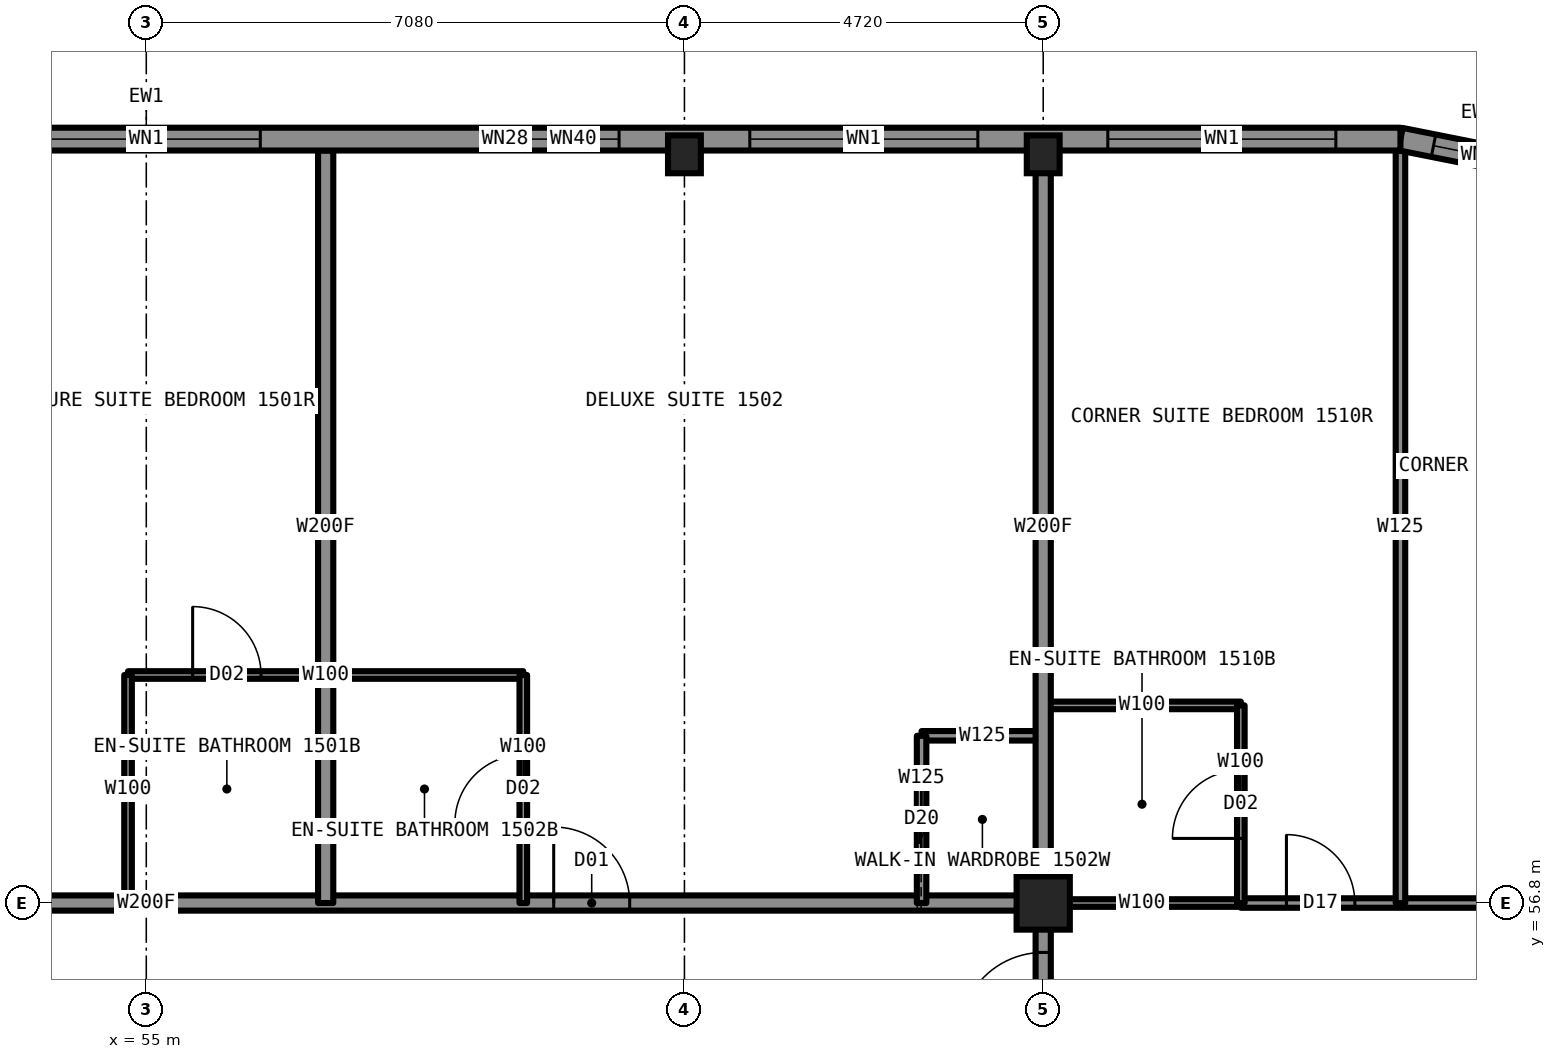
"""IFC4 building model, lengths in metres.
Left out: names, types, materials, properties, quantities, classifications, styles, units other than length and angle.
Written with IfcOpenShell. Run it as: python <this file> out.ifc"""

import sys

from ifc_helpers import new_model, si_unit, direction, frame, frame_2d, origin, origin_2d, place, context, subcontext, project, spatial, rectangle, hollow_rectangle, i_section, extrude, element, fill, save


model = new_model("IFC4")
c1 = context("Model", 3, precision=1e-05, world=origin(), true_north=direction((0.0, 1.0)))
c2 = subcontext(c1, "Body", "Model", "MODEL_VIEW")
j1 = project(units=[si_unit("LENGTHUNIT", "METRE"), si_unit("PLANEANGLEUNIT", "RADIAN")], contexts=[c1])
p1 = place(None, origin())
s1 = spatial("IfcSite", under=j1, at=p1, CompositionType="ELEMENT")
p2 = place(p1, origin())
s2 = spatial("IfcBuilding", under=s1, at=p2, CompositionType="ELEMENT")
p3 = place(p2, frame((0.0, 0.0, 60.0)))
s3 = spatial("IfcBuildingStorey", under=s2, at=p3, CompositionType="ELEMENT", Elevation=60.0)
for number, where, z_axis, x_axis in (
    (1, (62.08, 66.65, 0.0), (0.0, 0.0, 1.0), (1.0, 0.0, 0.0)),
    (2, (66.8, 66.65, 0.0), (0.0, 0.0, 1.0), (1.0, 0.0, 0.0)),
):
    element("IfcColumn", number, at=place(p3, frame(where, z_axis=z_axis, x_axis=x_axis)), inside=s3, PredefinedType="COLUMN", context=c2, shape_type="SweptSolid", body=[
        extrude(i_section(OverallWidth=0.432, OverallDepth=0.498, WebThickness=0.056, FlangeThickness=0.089, at=origin_2d()), origin(), (0.0, 0.0, 1.0), 3.5),
    ])
p4 = place(p3, frame((66.8, 56.8, 0.0), z_axis=(0.0, 0.0, 1.0), x_axis=(1.0, 0.0, 0.0)))
e3 = element("IfcColumn", 3, at=p4, inside=s3, PredefinedType="COLUMN", context=c2, shape_type="SweptSolid", body=[
    extrude(hollow_rectangle(XDim=0.7, YDim=0.7, WallThickness=0.06, at=origin_2d()), origin(), (0.0, 0.0, 1.0), 3.5),
])
p5 = place(p3, frame((66.8, 56.8, 0.0), z_axis=(0.0, 0.0, 1.0), x_axis=(1.0, 0.0, 0.0)))
e4 = element("IfcWall", 4, at=p5, inside=s3, PredefinedType="PARTITIONING", context=c2, shape_type="SweptSolid", body=[
    extrude(rectangle(XDim=2.6, YDim=0.1, at=frame_2d((1.3, 0.0))), origin(), (0.0, 0.0, 1.0), 2.573),
])
p6 = place(p3, frame((43.2, 56.8, 0.0), z_axis=(0.0, 0.0, 1.0), x_axis=(1.0, 0.0, 0.0)))
e5 = element("IfcWall", 5, at=p6, inside=s3, PredefinedType="PARTITIONING", context=c2, shape_type="SweptSolid", body=[
    extrude(rectangle(XDim=23.6, YDim=0.2, at=frame_2d((11.8, 0.0))), origin(), (0.0, 0.0, 1.0), 3.33),
])
p7 = place(p6, frame((1.85, 0.0, 0.0)))
e6 = element("IfcOpeningElement", 6, at=p7, cuts=e5, PredefinedType="OPENING", context=c2, shape_type="SweptSolid", body=[
    extrude(rectangle(XDim=1.1, YDim=2.2, at=frame_2d((0.55, 1.1))), frame((0.0, 0.11, 0.0), z_axis=(0.0, -1.0, 0.0), x_axis=(1.0, 0.0, 0.0)), (0.0, 0.0, 1.0), 0.22),
])
p8 = place(p6, frame((17.16, 0.0, 0.0)))
e7 = element("IfcOpeningElement", 7, at=p8, cuts=e5, PredefinedType="OPENING", context=c2, shape_type="SweptSolid", body=[
    extrude(rectangle(XDim=1.0, YDim=2.2, at=frame_2d((0.5, 1.1))), frame((0.0, 0.11, 0.0), z_axis=(0.0, -1.0, 0.0), x_axis=(1.0, 0.0, 0.0)), (0.0, 0.0, 1.0), 0.22),
])
p9 = place(p3, frame((69.4, 56.8, 0.0), z_axis=(0.0, 0.0, 1.0), x_axis=(1.0, 0.0, 0.0)))
e8 = element("IfcWall", 8, at=p9, inside=s3, PredefinedType="PARTITIONING", context=c2, shape_type="SweptSolid", body=[
    extrude(rectangle(XDim=7.3, YDim=0.125, at=frame_2d((3.65, 0.0))), origin(), (0.0, 0.0, 1.0), 2.573),
])
p10 = place(p9, frame((0.6, 0.0, 0.0)))
e9 = element("IfcOpeningElement", 9, at=p10, cuts=e8, PredefinedType="OPENING", context=c2, shape_type="SweptSolid", body=[
    extrude(rectangle(XDim=0.9, YDim=2.2, at=frame_2d((0.45, 1.1))), frame((0.0, 0.073, 0.0), z_axis=(0.0, -1.0, 0.0), x_axis=(1.0, 0.0, 0.0)), (0.0, 0.0, 1.0), 0.145),
])
p11 = place(p9, frame((4.4, 0.0, 0.0)))
e10 = element("IfcOpeningElement", 10, at=p11, cuts=e8, PredefinedType="OPENING", context=c2, shape_type="SweptSolid", body=[
    extrude(rectangle(XDim=0.9, YDim=2.2, at=frame_2d((0.45, 1.1))), frame((0.0, 0.073, 0.0), z_axis=(0.0, -1.0, 0.0), x_axis=(1.0, 0.0, 0.0)), (0.0, 0.0, 1.0), 0.145),
])
p12 = place(p3, frame((65.2, 59.0, 0.0), z_axis=(0.0, 0.0, 1.0), x_axis=(1.0, 0.0, 0.0)))
e11 = element("IfcWall", 11, at=p12, inside=s3, PredefinedType="PARTITIONING", context=c2, shape_type="SweptSolid", body=[
    extrude(rectangle(XDim=1.6, YDim=0.125, at=frame_2d((0.8, 0.0))), origin(), (0.0, 0.0, 1.0), 3.33),
])
p13 = place(p3, frame((66.8, 59.4, 0.0), z_axis=(0.0, 0.0, 1.0), x_axis=(1.0, 0.0, 0.0)))
e12 = element("IfcWall", 12, at=p13, inside=s3, PredefinedType="PARTITIONING", context=c2, shape_type="SweptSolid", body=[
    extrude(rectangle(XDim=2.6, YDim=0.1, at=frame_2d((1.3, 0.0))), origin(), (0.0, 0.0, 1.0), 3.33),
])
p14 = place(p3, frame((54.76, 59.8, 0.0), z_axis=(0.0, 0.0, 1.0), x_axis=(1.0, 0.0, 0.0)))
e13 = element("IfcWall", 13, at=p14, inside=s3, PredefinedType="PARTITIONING", context=c2, shape_type="SweptSolid", body=[
    extrude(rectangle(XDim=5.2, YDim=0.1, at=frame_2d((2.6, 0.0))), origin(), (0.0, 0.0, 1.0), 3.33),
])
p15 = place(p14, frame((0.85, 0.0, 0.0)))
e14 = element("IfcOpeningElement", 14, at=p15, cuts=e13, PredefinedType="OPENING", context=c2, shape_type="SweptSolid", body=[
    extrude(rectangle(XDim=0.9, YDim=2.1, at=frame_2d((0.45, 1.05))), frame((0.0, 0.06, 0.0), z_axis=(0.0, -1.0, 0.0), x_axis=(1.0, 0.0, 0.0)), (0.0, 0.0, 1.0), 0.12),
])
p16 = place(p3, frame((54.76, 56.8, 0.0), z_axis=(0.0, 0.0, 1.0), x_axis=(0.0, 1.0, 0.0)))
e15 = element("IfcWall", 15, at=p16, inside=s3, PredefinedType="PARTITIONING", context=c2, shape_type="SweptSolid", body=[
    extrude(rectangle(XDim=3.0, YDim=0.1, at=frame_2d((1.5, 0.0))), origin(), (0.0, 0.0, 1.0), 3.33),
])
p17 = place(p3, frame((65.2, 56.8, 0.0), z_axis=(0.0, 0.0, 1.0), x_axis=(0.0, 1.0, 0.0)))
e16 = element("IfcWall", 16, at=p17, inside=s3, PredefinedType="PARTITIONING", context=c2, shape_type="SweptSolid", body=[
    extrude(rectangle(XDim=2.2, YDim=0.125, at=frame_2d((1.1, 0.0))), origin(), (0.0, 0.0, 1.0), 3.33),
])
p18 = place(p17, frame((0.7, 0.0, 0.0)))
e17 = element("IfcOpeningElement", 17, at=p18, cuts=e16, PredefinedType="OPENING", context=c2, shape_type="SweptSolid", body=[
    extrude(rectangle(XDim=0.8, YDim=2.1, at=frame_2d((0.4, 1.05))), frame((0.0, 0.073, 0.0), z_axis=(0.0, -1.0, 0.0), x_axis=(1.0, 0.0, 0.0)), (0.0, 0.0, 1.0), 0.145),
])
p19 = place(p3, frame((66.8, 33.22, 0.0), z_axis=(0.0, 0.0, 1.0), x_axis=(0.0, 1.0, 0.0)))
e18 = element("IfcWall", 18, at=p19, inside=s3, PredefinedType="PARTITIONING", context=c2, shape_type="SweptSolid", body=[
    extrude(rectangle(XDim=23.58, YDim=0.2, at=frame_2d((11.79, 0.0))), origin(), (0.0, 0.0, 1.0), 3.33),
])
p20 = place(p19, frame((7.7, 0.0, 0.0)))
e19 = element("IfcOpeningElement", 19, at=p20, cuts=e18, PredefinedType="OPENING", context=c2, shape_type="SweptSolid", body=[
    extrude(rectangle(XDim=1.0, YDim=2.2, at=frame_2d((0.5, 1.1))), frame((0.0, 0.11, 0.0), z_axis=(0.0, -1.0, 0.0), x_axis=(1.0, 0.0, 0.0)), (0.0, 0.0, 1.0), 0.22),
])
p21 = place(p19, frame((17.29, 0.0, 0.0)))
e20 = element("IfcOpeningElement", 20, at=p21, cuts=e18, PredefinedType="OPENING", context=c2, shape_type="SweptSolid", body=[
    extrude(rectangle(XDim=1.0, YDim=2.2, at=frame_2d((0.5, 1.1))), frame((0.0, 0.11, 0.0), z_axis=(0.0, -1.0, 0.0), x_axis=(1.0, 0.0, 0.0)), (0.0, 0.0, 1.0), 0.22),
])
p22 = place(p19, frame((21.83, 0.0, 0.0)))
e21 = element("IfcOpeningElement", 21, at=p22, cuts=e18, PredefinedType="OPENING", context=c2, shape_type="SweptSolid", body=[
    extrude(rectangle(XDim=1.1, YDim=2.2, at=frame_2d((0.55, 1.1))), frame((0.0, 0.11, 0.0), z_axis=(0.0, -1.0, 0.0), x_axis=(1.0, 0.0, 0.0)), (0.0, 0.0, 1.0), 0.22),
])
p23 = place(p19, frame((0.63, 0.0, 0.0)))
e22 = element("IfcOpeningElement", 22, at=p23, cuts=e18, PredefinedType="OPENING", context=c2, shape_type="SweptSolid", body=[
    extrude(rectangle(XDim=1.1, YDim=2.2, at=frame_2d((0.55, 1.1))), frame((0.0, 0.11, 0.0), z_axis=(0.0, -1.0, 0.0), x_axis=(1.0, 0.0, 0.0)), (0.0, 0.0, 1.0), 0.22),
])
p24 = place(p3, frame((66.8, 56.8, 0.0), z_axis=(0.0, 0.0, 1.0), x_axis=(0.0, 1.0, 0.0)))
e23 = element("IfcWall", 23, at=p24, inside=s3, PredefinedType="PARTITIONING", context=c2, shape_type="SweptSolid", body=[
    extrude(rectangle(XDim=9.9, YDim=0.2, at=frame_2d((4.95, 0.0))), origin(), (0.0, 0.0, 1.0), 2.573),
])
p25 = place(p3, frame((69.4, 56.8, 0.0), z_axis=(0.0, 0.0, 1.0), x_axis=(0.0, 1.0, 0.0)))
e24 = element("IfcWall", 24, at=p25, inside=s3, PredefinedType="PARTITIONING", context=c2, shape_type="SweptSolid", body=[
    extrude(rectangle(XDim=2.6, YDim=0.1, at=frame_2d((1.3, 0.0))), origin(), (0.0, 0.0, 1.0), 3.33),
])
p26 = place(p25, frame((0.85, 0.0, 0.0)))
e25 = element("IfcOpeningElement", 25, at=p26, cuts=e24, PredefinedType="OPENING", context=c2, shape_type="SweptSolid", body=[
    extrude(rectangle(XDim=0.9, YDim=2.1, at=frame_2d((0.45, 1.05))), frame((0.0, 0.06, 0.0), z_axis=(0.0, -1.0, 0.0), x_axis=(1.0, 0.0, 0.0)), (0.0, 0.0, 1.0), 0.12),
])
p27 = place(p3, frame((71.5, 56.8, 0.0), z_axis=(0.0, 0.0, 1.0), x_axis=(0.0, 1.0, 0.0)))
e26 = element("IfcWall", 26, at=p27, inside=s3, PredefinedType="PARTITIONING", context=c2, shape_type="SweptSolid", body=[
    extrude(rectangle(XDim=9.894, YDim=0.125, at=frame_2d((4.947, 0.0))), origin(), (0.0, 0.0, 1.0), 3.33),
])
p28 = place(p3, frame((57.36, 56.8, 0.0), z_axis=(0.0, 0.0, 1.0), x_axis=(0.0, 1.0, 0.0)))
e27 = element("IfcWall", 27, at=p28, inside=s3, PredefinedType="PARTITIONING", context=c2, shape_type="SweptSolid", body=[
    extrude(rectangle(XDim=9.9, YDim=0.2, at=frame_2d((4.95, 0.0))), origin(), (0.0, 0.0, 1.0), 3.33),
])
p29 = place(p3, frame((59.96, 56.8, 0.0), z_axis=(0.0, 0.0, 1.0), x_axis=(0.0, 1.0, 0.0)))
e28 = element("IfcWall", 28, at=p29, inside=s3, PredefinedType="PARTITIONING", context=c2, shape_type="SweptSolid", body=[
    extrude(rectangle(XDim=3.0, YDim=0.1, at=frame_2d((1.5, 0.0))), origin(), (0.0, 0.0, 1.0), 3.33),
])
p30 = place(p29, frame((1.05, 0.0, 0.0)))
e29 = element("IfcOpeningElement", 29, at=p30, cuts=e28, PredefinedType="OPENING", context=c2, shape_type="SweptSolid", body=[
    extrude(rectangle(XDim=0.9, YDim=2.1, at=frame_2d((0.45, 1.05))), frame((0.0, 0.06, 0.0), z_axis=(0.0, -1.0, 0.0), x_axis=(1.0, 0.0, 0.0)), (0.0, 0.0, 1.0), 0.12),
])
p31 = place(p3, frame((73.547, 66.443, 0.0), z_axis=(0.0, 0.0, 1.0), x_axis=(-0.980787050784, 0.195081421501, 0.0)))
e30 = element("IfcWall", 30, at=p31, inside=s3, PredefinedType="SOLIDWALL", context=c2, shape_type="SweptSolid", body=[
    extrude(rectangle(XDim=2.087, YDim=0.3, at=frame_2d((1.044, 0.0))), origin(), (0.0, 0.0, 1.0), 3.33),
])
p32 = place(p31, frame((0.444, 0.0, 0.5)))
e31 = element("IfcOpeningElement", 31, at=p32, cuts=e30, PredefinedType="OPENING", context=c2, shape_type="SweptSolid", body=[
    extrude(rectangle(XDim=1.2, YDim=2.0, at=frame_2d((0.6, 1.0))), frame((0.0, 0.16, 0.0), z_axis=(0.0, -1.0, 0.0), x_axis=(1.0, 0.0, 0.0)), (0.0, 0.0, 1.0), 0.32),
])
p33 = place(p3, frame((71.5, 66.85, 0.0), z_axis=(0.0, 0.0, 1.0), x_axis=(-1.0, 0.0, 0.0)))
e32 = element("IfcWall", 32, at=p33, inside=s3, PredefinedType="SOLIDWALL", context=c2, shape_type="SweptSolid", body=[
    extrude(rectangle(XDim=33.0, YDim=0.3, at=frame_2d((16.5, 0.0))), origin(), (0.0, 0.0, 1.0), 2.83),
])
p34 = place(p33, frame((0.85, 0.0, 0.5)))
e33 = element("IfcOpeningElement", 33, at=p34, cuts=e32, PredefinedType="OPENING", context=c2, shape_type="SweptSolid", body=[
    extrude(rectangle(XDim=3.0, YDim=2.0, at=frame_2d((1.5, 1.0))), frame((0.0, 0.16, 0.0), z_axis=(0.0, -1.0, 0.0), x_axis=(1.0, 0.0, 0.0)), (0.0, 0.0, 1.0), 0.32),
])
p35 = place(p33, frame((5.56, 0.0, 0.5)))
e34 = element("IfcOpeningElement", 34, at=p35, cuts=e32, PredefinedType="OPENING", context=c2, shape_type="SweptSolid", body=[
    extrude(rectangle(XDim=3.0, YDim=2.0, at=frame_2d((1.5, 1.0))), frame((0.0, 0.16, 0.0), z_axis=(0.0, -1.0, 0.0), x_axis=(1.0, 0.0, 0.0)), (0.0, 0.0, 1.0), 0.32),
])
p36 = place(p33, frame((10.28, 0.0, 0.5)))
e35 = element("IfcOpeningElement", 35, at=p36, cuts=e32, PredefinedType="OPENING", context=c2, shape_type="SweptSolid", body=[
    extrude(rectangle(XDim=1.2, YDim=1.7, at=frame_2d((0.6, 0.85))), frame((0.0, 0.16, 0.0), z_axis=(0.0, -1.0, 0.0), x_axis=(1.0, 0.0, 0.0)), (0.0, 0.0, 1.0), 0.32),
])
p37 = place(p33, frame((15.0, 0.0, 0.5)))
e36 = element("IfcOpeningElement", 36, at=p37, cuts=e32, PredefinedType="OPENING", context=c2, shape_type="SweptSolid", body=[
    extrude(rectangle(XDim=3.0, YDim=2.0, at=frame_2d((1.5, 1.0))), frame((0.0, 0.16, 0.0), z_axis=(0.0, -1.0, 0.0), x_axis=(1.0, 0.0, 0.0)), (0.0, 0.0, 1.0), 0.32),
])
p38 = place(p33, frame((21.52, 0.0, 0.5)))
e37 = element("IfcOpeningElement", 37, at=p38, cuts=e32, PredefinedType="OPENING", context=c2, shape_type="SweptSolid", body=[
    extrude(rectangle(XDim=1.2, YDim=1.7, at=frame_2d((0.6, 0.85))), frame((0.0, 0.16, 0.0), z_axis=(0.0, -1.0, 0.0), x_axis=(1.0, 0.0, 0.0)), (0.0, 0.0, 1.0), 0.32),
])
p39 = place(p33, frame((24.44, 0.0, 0.5)))
e38 = element("IfcOpeningElement", 38, at=p39, cuts=e32, PredefinedType="OPENING", context=c2, shape_type="SweptSolid", body=[
    extrude(rectangle(XDim=3.0, YDim=2.0, at=frame_2d((1.5, 1.0))), frame((0.0, 0.16, 0.0), z_axis=(0.0, -1.0, 0.0), x_axis=(1.0, 0.0, 0.0)), (0.0, 0.0, 1.0), 0.32),
])
p40 = place(p33, frame((29.15, 0.0, 0.5)))
e39 = element("IfcOpeningElement", 39, at=p40, cuts=e32, PredefinedType="OPENING", context=c2, shape_type="SweptSolid", body=[
    extrude(rectangle(XDim=3.0, YDim=2.0, at=frame_2d((1.5, 1.0))), frame((0.0, 0.16, 0.0), z_axis=(0.0, -1.0, 0.0), x_axis=(1.0, 0.0, 0.0)), (0.0, 0.0, 1.0), 0.32),
])
p41 = place(p33, frame((11.48, 0.0, 0.5)))
e40 = element("IfcOpeningElement", 40, at=p41, cuts=e32, PredefinedType="OPENING", context=c2, shape_type="SweptSolid", body=[
    extrude(rectangle(XDim=0.6, YDim=0.8, at=frame_2d((0.3, 0.4))), frame((0.0, 0.16, 0.0), z_axis=(0.0, -1.0, 0.0), x_axis=(1.0, 0.0, 0.0)), (0.0, 0.0, 1.0), 0.32),
])
p42 = place(p33, frame((20.87, 0.0, 0.5)))
e41 = element("IfcOpeningElement", 41, at=p42, cuts=e32, PredefinedType="OPENING", context=c2, shape_type="SweptSolid", body=[
    extrude(rectangle(XDim=0.6, YDim=0.8, at=frame_2d((0.3, 0.4))), frame((0.0, 0.16, 0.0), z_axis=(0.0, -1.0, 0.0), x_axis=(1.0, 0.0, 0.0)), (0.0, 0.0, 1.0), 0.32),
])
p43 = place(p15, origin())
e42 = element("IfcDoor", 42, at=p43, inside=s3, OperationType="SINGLE_SWING_RIGHT", PredefinedType="DOOR", context=c2, shape_type="SweptSolid", body=[
    extrude(rectangle(XDim=0.9, YDim=2.1, at=frame_2d((0.45, 1.05))), frame((0.0, 0.025, 0.0), z_axis=(0.0, -1.0, 0.0), x_axis=(1.0, 0.0, 0.0)), (0.0, 0.0, 1.0), 0.05),
])
fill(e14, e42)
p44 = place(p8, origin())
e43 = element("IfcDoor", 43, at=p44, inside=s3, OperationType="SINGLE_SWING_LEFT", PredefinedType="DOOR", context=c2, shape_type="SweptSolid", body=[
    extrude(rectangle(XDim=1.0, YDim=2.2, at=frame_2d((0.5, 1.1))), frame((0.0, 0.025, 0.0), z_axis=(0.0, -1.0, 0.0), x_axis=(1.0, 0.0, 0.0)), (0.0, 0.0, 1.0), 0.05),
])
fill(e7, e43)
p45 = place(p30, origin())
e44 = element("IfcDoor", 44, at=p45, inside=s3, OperationType="SINGLE_SWING_RIGHT", PredefinedType="DOOR", context=c2, shape_type="SweptSolid", body=[
    extrude(rectangle(XDim=0.9, YDim=2.1, at=frame_2d((0.45, 1.05))), frame((0.0, 0.025, 0.0), z_axis=(0.0, -1.0, 0.0), x_axis=(1.0, 0.0, 0.0)), (0.0, 0.0, 1.0), 0.05),
])
fill(e29, e44)
p46 = place(p18, origin())
e45 = element("IfcDoor", 45, at=p46, inside=s3, OperationType="SLIDING_TO_LEFT", PredefinedType="DOOR", context=c2, shape_type="SweptSolid", body=[
    extrude(rectangle(XDim=0.8, YDim=2.1, at=frame_2d((0.4, 1.05))), frame((0.0, 0.025, 0.0), z_axis=(0.0, -1.0, 0.0), x_axis=(1.0, 0.0, 0.0)), (0.0, 0.0, 1.0), 0.05),
])
fill(e17, e45)
p47 = place(p22, origin())
e46 = element("IfcDoor", 46, at=p47, inside=s3, OperationType="SINGLE_SWING_LEFT", PredefinedType="DOOR", context=c2, shape_type="SweptSolid", body=[
    extrude(rectangle(XDim=1.1, YDim=2.2, at=frame_2d((0.55, 1.1))), frame((0.0, 0.025, 0.0), z_axis=(0.0, -1.0, 0.0), x_axis=(1.0, 0.0, 0.0)), (0.0, 0.0, 1.0), 0.05),
])
fill(e21, e46)
p48 = place(p26, origin())
e47 = element("IfcDoor", 47, at=p48, inside=s3, OperationType="SINGLE_SWING_RIGHT", PredefinedType="DOOR", context=c2, shape_type="SweptSolid", body=[
    extrude(rectangle(XDim=0.9, YDim=2.1, at=frame_2d((0.45, 1.05))), frame((0.0, 0.025, 0.0), z_axis=(0.0, -1.0, 0.0), x_axis=(1.0, 0.0, 0.0)), (0.0, 0.0, 1.0), 0.05),
])
fill(e25, e47)
p49 = place(p10, origin())
e48 = element("IfcDoor", 48, at=p49, inside=s3, OperationType="SINGLE_SWING_LEFT", PredefinedType="DOOR", context=c2, shape_type="SweptSolid", body=[
    extrude(rectangle(XDim=0.9, YDim=2.2, at=frame_2d((0.45, 1.1))), frame((0.0, 0.025, 0.0), z_axis=(0.0, -1.0, 0.0), x_axis=(1.0, 0.0, 0.0)), (0.0, 0.0, 1.0), 0.05),
])
fill(e9, e48)
p50 = place(p32, origin())
e49 = element("IfcWindow", 49, at=p50, inside=s3, PartitioningType="SINGLE_PANEL", PredefinedType="WINDOW", context=c2, shape_type="SweptSolid", body=[
    extrude(rectangle(XDim=1.2, YDim=2.0, at=frame_2d((0.6, 1.0))), frame((0.0, 0.03, 0.0), z_axis=(0.0, -1.0, 0.0), x_axis=(1.0, 0.0, 0.0)), (0.0, 0.0, 1.0), 0.06),
])
fill(e31, e49)
p51 = place(p34, origin())
e50 = element("IfcWindow", 50, at=p51, inside=s3, PartitioningType="SINGLE_PANEL", PredefinedType="WINDOW", context=c2, shape_type="SweptSolid", body=[
    extrude(rectangle(XDim=3.0, YDim=2.0, at=frame_2d((1.5, 1.0))), frame((0.0, 0.03, 0.0), z_axis=(0.0, -1.0, 0.0), x_axis=(1.0, 0.0, 0.0)), (0.0, 0.0, 1.0), 0.06),
])
fill(e33, e50)
p52 = place(p35, origin())
e51 = element("IfcWindow", 51, at=p52, inside=s3, PartitioningType="SINGLE_PANEL", PredefinedType="WINDOW", context=c2, shape_type="SweptSolid", body=[
    extrude(rectangle(XDim=3.0, YDim=2.0, at=frame_2d((1.5, 1.0))), frame((0.0, 0.03, 0.0), z_axis=(0.0, -1.0, 0.0), x_axis=(1.0, 0.0, 0.0)), (0.0, 0.0, 1.0), 0.06),
])
fill(e34, e51)
p53 = place(p36, origin())
e52 = element("IfcWindow", 52, at=p53, inside=s3, PartitioningType="SINGLE_PANEL", PredefinedType="WINDOW", context=c2, shape_type="SweptSolid", body=[
    extrude(rectangle(XDim=1.2, YDim=1.7, at=frame_2d((0.6, 0.85))), frame((0.0, 0.03, 0.0), z_axis=(0.0, -1.0, 0.0), x_axis=(1.0, 0.0, 0.0)), (0.0, 0.0, 1.0), 0.06),
])
fill(e35, e52)
p54 = place(p37, origin())
e53 = element("IfcWindow", 53, at=p54, inside=s3, PartitioningType="SINGLE_PANEL", PredefinedType="WINDOW", context=c2, shape_type="SweptSolid", body=[
    extrude(rectangle(XDim=3.0, YDim=2.0, at=frame_2d((1.5, 1.0))), frame((0.0, 0.03, 0.0), z_axis=(0.0, -1.0, 0.0), x_axis=(1.0, 0.0, 0.0)), (0.0, 0.0, 1.0), 0.06),
])
fill(e36, e53)
p55 = place(p41, origin())
e54 = element("IfcWindow", 54, at=p55, inside=s3, PartitioningType="SINGLE_PANEL", PredefinedType="WINDOW", context=c2, shape_type="SweptSolid", body=[
    extrude(rectangle(XDim=0.6, YDim=0.8, at=frame_2d((0.3, 0.4))), frame((0.0, 0.03, 0.0), z_axis=(0.0, -1.0, 0.0), x_axis=(1.0, 0.0, 0.0)), (0.0, 0.0, 1.0), 0.06),
])
fill(e40, e54)
save(model, sys.argv[1])
